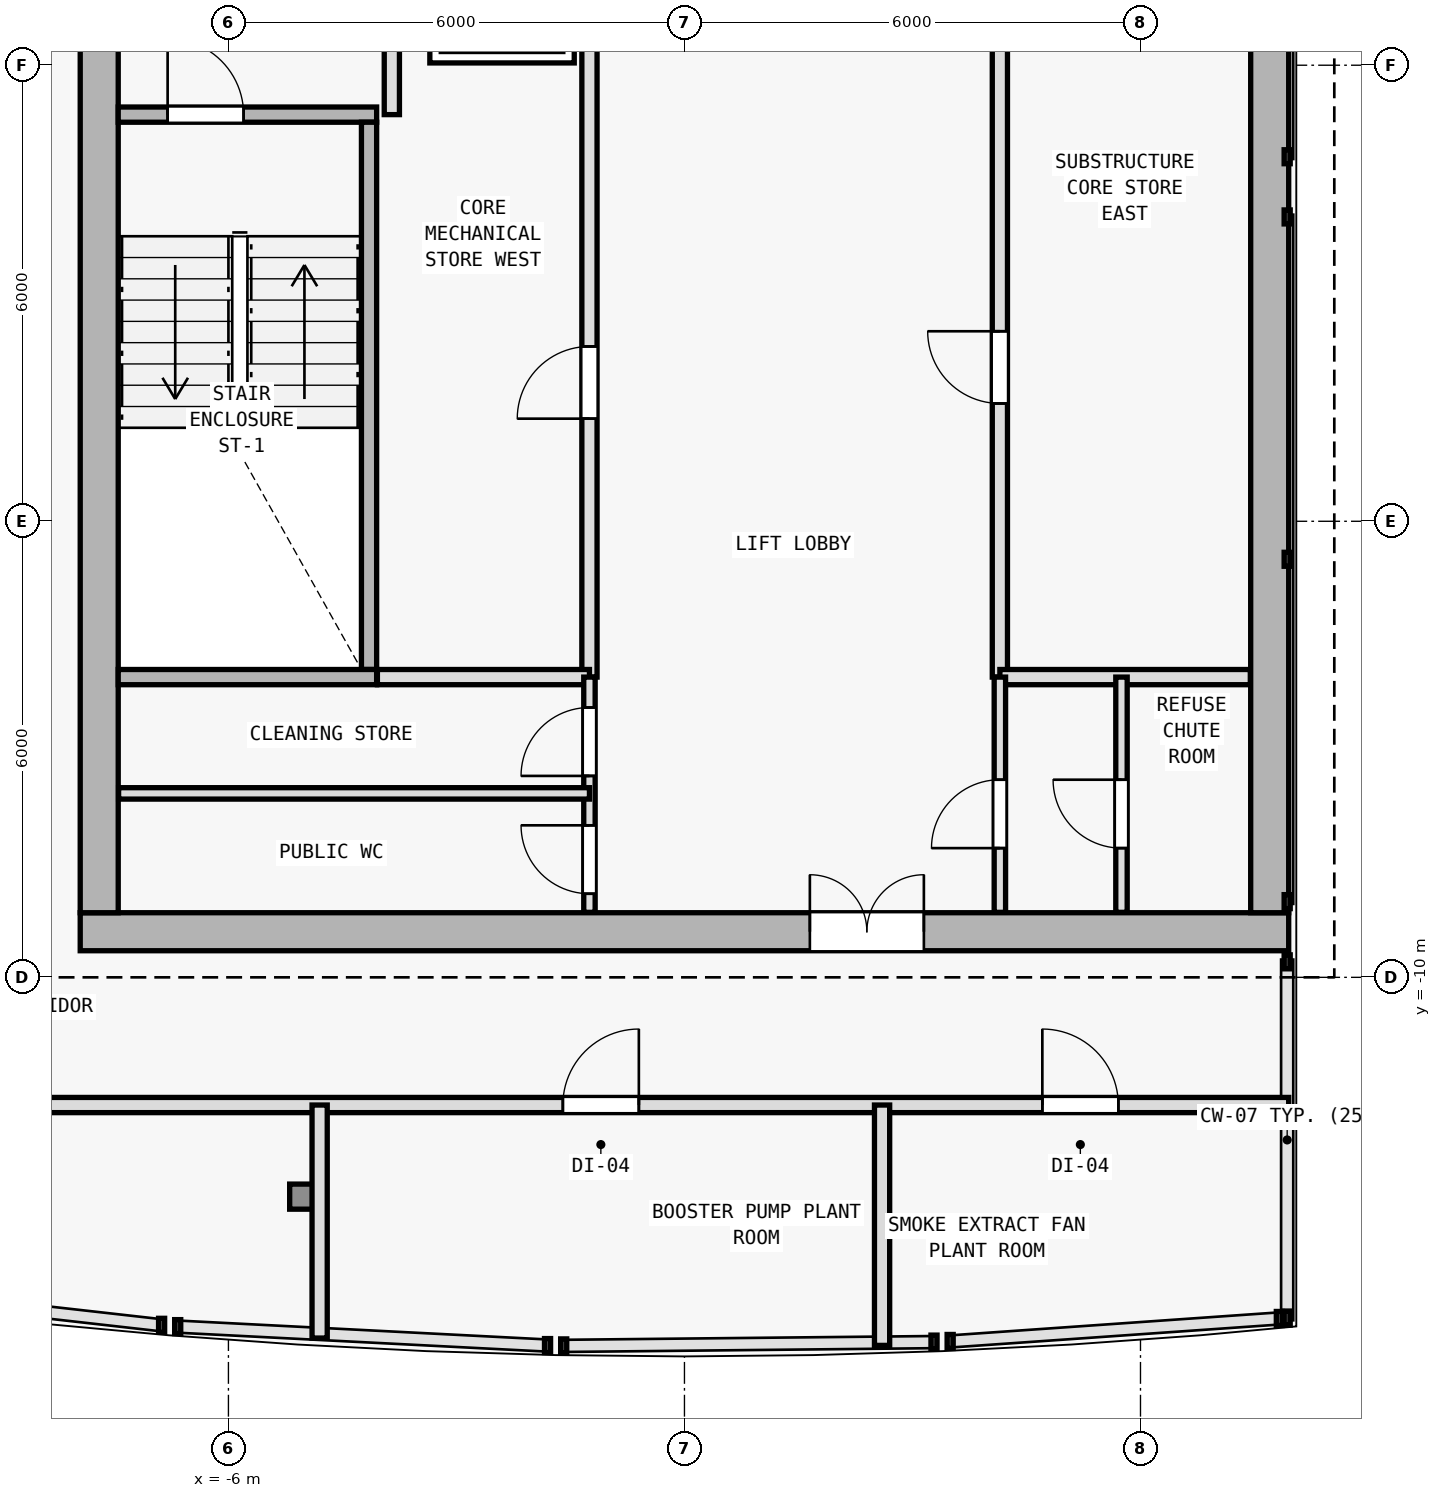
"""IFC4 building model, lengths in metres.
Left out: names, types, materials, properties, quantities, classifications, styles, units other than length and angle.
Written with IfcOpenShell. Run it as: python <this file> out.ifc"""

import sys

from ifc_helpers import new_model, si_unit, direction, frame, frame_2d, origin, origin_2d, place, context, subcontext, project, spatial, rectangle, i_section, extrude, element, fill, save


model = new_model("IFC4")
c1 = context("Model", 3, precision=1e-05, world=origin(), true_north=direction((0.0, 1.0)))
c2 = subcontext(c1, "Body", "Model", "MODEL_VIEW")
j1 = project(units=[si_unit("LENGTHUNIT", "METRE"), si_unit("PLANEANGLEUNIT", "RADIAN")], contexts=[c1])
p1 = place(None, origin())
s1 = spatial("IfcSite", under=j1, at=p1, CompositionType="ELEMENT")
p2 = place(p1, origin())
s2 = spatial("IfcBuilding", under=s1, at=p2, CompositionType="ELEMENT")
p3 = place(p2, frame((0.0, 0.0, 308.4)))
s3 = spatial("IfcBuildingStorey", under=s2, at=p3, CompositionType="ELEMENT", Elevation=308.4)
for number, where, z_axis, x_axis in (
    (1, (-7.7, -9.4, 0.0), (0.0, 0.0, 1.0), (1.0, 0.0, 0.0)),
    (2, (7.7, -9.4, 0.0), (0.0, 0.0, 1.0), (1.0, 0.0, 0.0)),
    (3, (0.0, -9.4, 0.0), (0.0, 0.0, 1.0), (1.0, 0.0, 0.0)),
    (4, (7.7, 0.4, 0.0), (0.0, 0.0, 1.0), (1.0, 0.0, 0.0)),
    (5, (-7.7, 2.0, 0.0), (0.0, 0.0, 1.0), (1.0, 0.0, 0.0)),
):
    element("IfcColumn", number, at=place(p3, frame(where, z_axis=z_axis, x_axis=x_axis)), inside=s3, PredefinedType="COLUMN", context=c2, shape_type="SweptSolid", body=[
        extrude(i_section(OverallWidth=0.374, OverallDepth=0.372, WebThickness=0.012, FlangeThickness=0.02, FilletRadius=0.015, at=origin_2d()), origin(), (0.0, 0.0, 1.0), 3.6),
    ])
p4 = place(p3, frame((-5.04, -12.885, 0.0), z_axis=(0.0, 0.0, 1.0), x_axis=(1.0, 0.0, 0.0)))
e6 = element("IfcColumn", 6, at=p4, inside=s3, PredefinedType="COLUMN", context=c2, shape_type="SweptSolid", body=[
    extrude(i_section(OverallWidth=0.309, OverallDepth=0.33, WebThickness=0.011, FlangeThickness=0.019, FilletRadius=0.027, at=origin_2d()), origin(), (0.0, 0.0, 1.0), 3.6),
])
p5 = place(p3, frame((-7.95, -9.4, 0.0), z_axis=(0.0, 0.0, 1.0), x_axis=(1.0, 0.0, 0.0)))
e7 = element("IfcWall", 7, at=p5, inside=s3, PredefinedType="SHEAR", context=c2, shape_type="SweptSolid", body=[
    extrude(rectangle(XDim=15.9, YDim=0.5, at=frame_2d((7.95, 0.0))), origin(), (0.0, 0.0, 1.0), 3.34),
])
p6 = place(p5, frame((9.6, 0.0, 0.0)))
e8 = element("IfcOpeningElement", 8, at=p6, cuts=e7, PredefinedType="OPENING", context=c2, shape_type="SweptSolid", body=[
    extrude(rectangle(XDim=1.5, YDim=2.2, at=frame_2d((0.75, 1.1))), frame((0.0, 0.26, 0.0), z_axis=(0.0, -1.0, 0.0), x_axis=(1.0, 0.0, 0.0)), (0.0, 0.0, 1.0), 0.52),
])
p7 = place(p3, frame((-7.7, -9.15, 0.0), z_axis=(0.0, 0.0, 1.0), x_axis=(0.0, 1.0, 0.0)))
e9 = element("IfcWall", 9, at=p7, inside=s3, PredefinedType="SHEAR", context=c2, shape_type="SweptSolid", body=[
    extrude(rectangle(XDim=19.1, YDim=0.5, at=frame_2d((9.55, 0.0))), origin(), (0.0, 0.0, 1.0), 3.34),
])
p8 = place(p7, frame((12.7, 0.0, 0.0)))
e10 = element("IfcOpeningElement", 10, at=p8, cuts=e9, PredefinedType="OPENING", context=c2, shape_type="SweptSolid", body=[
    extrude(rectangle(XDim=1.1, YDim=2.15, at=frame_2d((0.55, 1.075))), frame((0.0, 0.26, 0.0), z_axis=(0.0, -1.0, 0.0), x_axis=(1.0, 0.0, 0.0)), (0.0, 0.0, 1.0), 0.52),
])
p9 = place(p3, frame((7.7, 9.95, 0.0), z_axis=(0.0, 0.0, 1.0), x_axis=(0.0, -1.0, 0.0)))
e11 = element("IfcWall", 11, at=p9, inside=s3, PredefinedType="SHEAR", context=c2, shape_type="SweptSolid", body=[
    extrude(rectangle(XDim=19.1, YDim=0.5, at=frame_2d((9.55, 0.0))), origin(), (0.0, 0.0, 1.0), 3.34),
])
p10 = place(p3, frame((-7.45, 1.35, 0.0), z_axis=(0.0, 0.0, 1.0), x_axis=(1.0, 0.0, 0.0)))
e12 = element("IfcWall", 12, at=p10, inside=s3, PredefinedType="SOLIDWALL", context=c2, shape_type="SweptSolid", body=[
    extrude(rectangle(XDim=3.4, YDim=0.2, at=frame_2d((1.7, 0.0))), origin(), (0.0, 0.0, 1.0), 3.34),
])
p11 = place(p10, frame((0.65, 0.0, 0.0)))
e13 = element("IfcOpeningElement", 13, at=p11, cuts=e12, PredefinedType="OPENING", context=c2, shape_type="SweptSolid", body=[
    extrude(rectangle(XDim=1.0, YDim=2.15, at=frame_2d((0.5, 1.075))), frame((0.0, 0.11, 0.0), z_axis=(0.0, -1.0, 0.0), x_axis=(1.0, 0.0, 0.0)), (0.0, 0.0, 1.0), 0.22),
])
p12 = place(p3, frame((-4.15, -5.95, 0.0), z_axis=(0.0, 0.0, 1.0), x_axis=(0.0, 1.0, 0.0)))
e14 = element("IfcWall", 14, at=p12, inside=s3, PredefinedType="SOLIDWALL", context=c2, shape_type="SweptSolid", body=[
    extrude(rectangle(XDim=7.2, YDim=0.2, at=frame_2d((3.6, 0.0))), origin(), (0.0, 0.0, 1.0), 3.34),
])
p13 = place(p3, frame((-3.85, 1.35, 0.0), z_axis=(0.0, 0.0, 1.0), x_axis=(0.0, 1.0, 0.0)))
e15 = element("IfcWall", 15, at=p13, inside=s3, PredefinedType="SOLIDWALL", context=c2, shape_type="SweptSolid", body=[
    extrude(rectangle(XDim=8.595, YDim=0.2, at=frame_2d((4.297, 0.0))), origin(), (0.0, 0.0, 1.0), 3.34),
])
p14 = place(p13, frame((1.5, 0.0, 0.0)))
e16 = element("IfcOpeningElement", 16, at=p14, cuts=e15, PredefinedType="OPENING", context=c2, shape_type="SweptSolid", body=[
    extrude(rectangle(XDim=1.0, YDim=2.15, at=frame_2d((0.5, 1.075))), frame((0.0, 0.11, 0.0), z_axis=(0.0, -1.0, 0.0), x_axis=(1.0, 0.0, 0.0)), (0.0, 0.0, 1.0), 0.22),
])
p15 = place(p13, frame((3.18, 0.0, 0.0)))
e17 = element("IfcOpeningElement", 17, at=p15, cuts=e15, PredefinedType="OPENING", context=c2, shape_type="SweptSolid", body=[
    extrude(rectangle(XDim=1.0, YDim=2.15, at=frame_2d((0.5, 1.075))), frame((0.0, 0.11, 0.0), z_axis=(0.0, -1.0, 0.0), x_axis=(1.0, 0.0, 0.0)), (0.0, 0.0, 1.0), 0.22),
])
p16 = place(p3, frame((4.15, -6.05, 0.0), z_axis=(0.0, 0.0, 1.0), x_axis=(0.0, 1.0, 0.0)))
e18 = element("IfcWall", 18, at=p16, inside=s3, PredefinedType="SOLIDWALL", context=c2, shape_type="SweptSolid", body=[
    extrude(rectangle(XDim=8.7, YDim=0.2, at=frame_2d((4.35, 0.0))), origin(), (0.0, 0.0, 1.0), 3.34),
])
p17 = place(p16, frame((3.6, 0.0, 0.0)))
e19 = element("IfcOpeningElement", 19, at=p17, cuts=e18, PredefinedType="OPENING", context=c2, shape_type="SweptSolid", body=[
    extrude(rectangle(XDim=0.95, YDim=2.1, at=frame_2d((0.475, 1.05))), frame((0.0, 0.11, 0.0), z_axis=(0.0, -1.0, 0.0), x_axis=(1.0, 0.0, 0.0)), (0.0, 0.0, 1.0), 0.22),
])
p18 = place(p3, frame((-1.25, -6.05, 0.0), z_axis=(0.0, 0.0, 1.0), x_axis=(0.0, 1.0, 0.0)))
e20 = element("IfcWall", 20, at=p18, inside=s3, PredefinedType="SOLIDWALL", context=c2, shape_type="SweptSolid", body=[
    extrude(rectangle(XDim=8.7, YDim=0.2, at=frame_2d((4.35, 0.0))), origin(), (0.0, 0.0, 1.0), 3.34),
])
p19 = place(p18, frame((3.4, 0.0, 0.0)))
e21 = element("IfcOpeningElement", 21, at=p19, cuts=e20, PredefinedType="OPENING", context=c2, shape_type="SweptSolid", body=[
    extrude(rectangle(XDim=0.95, YDim=2.1, at=frame_2d((0.475, 1.05))), frame((0.0, 0.11, 0.0), z_axis=(0.0, -1.0, 0.0), x_axis=(1.0, 0.0, 0.0)), (0.0, 0.0, 1.0), 0.22),
])
p20 = place(p3, frame((-7.45, -6.05, 0.0), z_axis=(0.0, 0.0, 1.0), x_axis=(1.0, 0.0, 0.0)))
e22 = element("IfcWall", 22, at=p20, inside=s3, PredefinedType="SOLIDWALL", context=c2, shape_type="SweptSolid", body=[
    extrude(rectangle(XDim=3.4, YDim=0.2, at=frame_2d((1.7, 0.0))), origin(), (0.0, 0.0, 1.0), 3.34),
])
p21 = place(p3, frame((-4.04, -6.05, 0.0), z_axis=(0.0, 0.0, 1.0), x_axis=(1.0, 0.0, 0.0)))
e23 = element("IfcWall", 23, at=p21, inside=s3, PredefinedType="SOLIDWALL", context=c2, shape_type="SweptSolid", body=[
    extrude(rectangle(XDim=2.79, YDim=0.2, at=frame_2d((1.395, 0.0))), origin(), (0.0, 0.0, 1.0), 3.34),
])
p22 = place(p3, frame((4.15, -6.05, 0.0), z_axis=(0.0, 0.0, 1.0), x_axis=(1.0, 0.0, 0.0)))
e24 = element("IfcWall", 24, at=p22, inside=s3, PredefinedType="SOLIDWALL", context=c2, shape_type="SweptSolid", body=[
    extrude(rectangle(XDim=3.295, YDim=0.2, at=frame_2d((1.647, 0.0))), origin(), (0.0, 0.0, 1.0), 3.34),
])
p23 = place(p3, frame((-1.25, -9.145, 0.0), z_axis=(0.0, 0.0, 1.0), x_axis=(0.0, 1.0, 0.0)))
e25 = element("IfcWall", 25, at=p23, inside=s3, PredefinedType="PARTITIONING", context=c2, shape_type="SweptSolid", body=[
    extrude(rectangle(XDim=3.095, YDim=0.15, at=frame_2d((1.547, 0.0))), origin(), (0.0, 0.0, 1.0), 3.34),
])
p24 = place(p23, frame((1.795, 0.0, 0.0)))
e26 = element("IfcOpeningElement", 26, at=p24, cuts=e25, PredefinedType="OPENING", context=c2, shape_type="SweptSolid", body=[
    extrude(rectangle(XDim=0.9, YDim=2.1, at=frame_2d((0.45, 1.05))), frame((0.0, 0.085, 0.0), z_axis=(0.0, -1.0, 0.0), x_axis=(1.0, 0.0, 0.0)), (0.0, 0.0, 1.0), 0.17),
])
p25 = place(p23, frame((0.245, 0.0, 0.0)))
e27 = element("IfcOpeningElement", 27, at=p25, cuts=e25, PredefinedType="OPENING", context=c2, shape_type="SweptSolid", body=[
    extrude(rectangle(XDim=0.9, YDim=2.1, at=frame_2d((0.45, 1.05))), frame((0.0, 0.085, 0.0), z_axis=(0.0, -1.0, 0.0), x_axis=(1.0, 0.0, 0.0)), (0.0, 0.0, 1.0), 0.17),
])
p26 = place(p3, frame((4.15, -9.145, 0.0), z_axis=(0.0, 0.0, 1.0), x_axis=(0.0, 1.0, 0.0)))
e28 = element("IfcWall", 28, at=p26, inside=s3, PredefinedType="PARTITIONING", context=c2, shape_type="SweptSolid", body=[
    extrude(rectangle(XDim=3.095, YDim=0.15, at=frame_2d((1.547, 0.0))), origin(), (0.0, 0.0, 1.0), 3.34),
])
p27 = place(p26, frame((0.845, 0.0, 0.0)))
e29 = element("IfcOpeningElement", 29, at=p27, cuts=e28, PredefinedType="OPENING", context=c2, shape_type="SweptSolid", body=[
    extrude(rectangle(XDim=0.9, YDim=2.1, at=frame_2d((0.45, 1.05))), frame((0.0, 0.085, 0.0), z_axis=(0.0, -1.0, 0.0), x_axis=(1.0, 0.0, 0.0)), (0.0, 0.0, 1.0), 0.17),
])
p28 = place(p3, frame((-7.445, -7.58, 0.0), z_axis=(0.0, 0.0, 1.0), x_axis=(1.0, 0.0, 0.0)))
e30 = element("IfcWall", 30, at=p28, inside=s3, PredefinedType="PARTITIONING", context=c2, shape_type="SweptSolid", body=[
    extrude(rectangle(XDim=6.195, YDim=0.15, at=frame_2d((3.098, 0.0))), origin(), (0.0, 0.0, 1.0), 3.34),
])
p29 = place(p3, frame((5.75, -9.145, 0.0), z_axis=(0.0, 0.0, 1.0), x_axis=(0.0, 1.0, 0.0)))
e31 = element("IfcWall", 31, at=p29, inside=s3, PredefinedType="PARTITIONING", context=c2, shape_type="SweptSolid", body=[
    extrude(rectangle(XDim=3.095, YDim=0.15, at=frame_2d((1.547, 0.0))), origin(), (0.0, 0.0, 1.0), 3.34),
])
p30 = place(p29, frame((0.845, 0.0, 0.0)))
e32 = element("IfcOpeningElement", 32, at=p30, cuts=e31, PredefinedType="OPENING", context=c2, shape_type="SweptSolid", body=[
    extrude(rectangle(XDim=0.9, YDim=2.1, at=frame_2d((0.45, 1.05))), frame((0.0, 0.085, 0.0), z_axis=(0.0, -1.0, 0.0), x_axis=(1.0, 0.0, 0.0)), (0.0, 0.0, 1.0), 0.17),
])
p31 = place(p3, frame((-10.18, -11.68, 0.0), z_axis=(0.0, 0.0, 1.0), x_axis=(1.0, 0.0, 0.0)))
e33 = element("IfcWall", 33, at=p31, inside=s3, PredefinedType="SOLIDWALL", context=c2, shape_type="SweptSolid", body=[
    extrude(rectangle(XDim=18.13, YDim=0.2, at=frame_2d((9.065, 0.0))), origin(), (0.0, 0.0, 1.0), 2.995),
])
p32 = place(p31, frame((8.58, 0.0, 0.0)))
e34 = element("IfcOpeningElement", 34, at=p32, cuts=e33, PredefinedType="OPENING", context=c2, shape_type="SweptSolid", body=[
    extrude(rectangle(XDim=1.0, YDim=2.15, at=frame_2d((0.5, 1.075))), frame((0.0, 0.11, 0.0), z_axis=(0.0, -1.0, 0.0), x_axis=(1.0, 0.0, 0.0)), (0.0, 0.0, 1.0), 0.22),
])
p33 = place(p31, frame((14.889, 0.0, 0.0)))
e35 = element("IfcOpeningElement", 35, at=p33, cuts=e33, PredefinedType="OPENING", context=c2, shape_type="SweptSolid", body=[
    extrude(rectangle(XDim=1.0, YDim=2.15, at=frame_2d((0.5, 1.075))), frame((0.0, 0.11, 0.0), z_axis=(0.0, -1.0, 0.0), x_axis=(1.0, 0.0, 0.0)), (0.0, 0.0, 1.0), 0.22),
])
p34 = place(p3, frame((-4.8, -14.746, 0.0), z_axis=(0.0, 0.0, 1.0), x_axis=(0.0, 1.0, 0.0)))
e36 = element("IfcWall", 36, at=p34, inside=s3, PredefinedType="SOLIDWALL", context=c2, shape_type="SweptSolid", body=[
    extrude(rectangle(XDim=3.066, YDim=0.2, at=frame_2d((1.533, 0.0))), origin(), (0.0, 0.0, 1.0), 2.995),
])
p35 = place(p3, frame((2.6, -14.842, 0.0), z_axis=(0.0, 0.0, 1.0), x_axis=(0.0, 1.0, 0.0)))
e37 = element("IfcWall", 37, at=p35, inside=s3, PredefinedType="SOLIDWALL", context=c2, shape_type="SweptSolid", body=[
    extrude(rectangle(XDim=3.162, YDim=0.2, at=frame_2d((1.581, 0.0))), origin(), (0.0, 0.0, 1.0), 3.34),
])
p36 = place(p6, origin())
e38 = element("IfcDoor", 38, at=p36, inside=s3, OperationType="DOUBLE_DOOR_SINGLE_SWING", PredefinedType="DOOR", context=c2, shape_type="SweptSolid", body=[
    extrude(rectangle(XDim=1.5, YDim=2.2, at=frame_2d((0.75, 1.1))), frame((0.0, 0.025, 0.0), z_axis=(0.0, -1.0, 0.0), x_axis=(1.0, 0.0, 0.0)), (0.0, 0.0, 1.0), 0.05),
])
fill(e8, e38)
p37 = place(p11, origin())
e39 = element("IfcDoor", 39, at=p37, inside=s3, OperationType="SINGLE_SWING_LEFT", PredefinedType="DOOR", context=c2, shape_type="SweptSolid", body=[
    extrude(rectangle(XDim=1.0, YDim=2.15, at=frame_2d((0.5, 1.075))), frame((0.0, 0.025, 0.0), z_axis=(0.0, -1.0, 0.0), x_axis=(1.0, 0.0, 0.0)), (0.0, 0.0, 1.0), 0.05),
])
fill(e13, e39)
p38 = place(p17, origin())
e40 = element("IfcDoor", 40, at=p38, inside=s3, OperationType="SINGLE_SWING_RIGHT", PredefinedType="DOOR", context=c2, shape_type="SweptSolid", body=[
    extrude(rectangle(XDim=0.95, YDim=2.1, at=frame_2d((0.475, 1.05))), frame((0.0, 0.025, 0.0), z_axis=(0.0, -1.0, 0.0), x_axis=(1.0, 0.0, 0.0)), (0.0, 0.0, 1.0), 0.05),
])
fill(e19, e40)
p39 = place(p19, origin())
e41 = element("IfcDoor", 41, at=p39, inside=s3, OperationType="SINGLE_SWING_LEFT", PredefinedType="DOOR", context=c2, shape_type="SweptSolid", body=[
    extrude(rectangle(XDim=0.95, YDim=2.1, at=frame_2d((0.475, 1.05))), frame((0.0, 0.025, 0.0), z_axis=(0.0, -1.0, 0.0), x_axis=(1.0, 0.0, 0.0)), (0.0, 0.0, 1.0), 0.05),
])
fill(e21, e41)
p40 = place(p24, origin())
e42 = element("IfcDoor", 42, at=p40, inside=s3, OperationType="SINGLE_SWING_LEFT", PredefinedType="DOOR", context=c2, shape_type="SweptSolid", body=[
    extrude(rectangle(XDim=0.9, YDim=2.1, at=frame_2d((0.45, 1.05))), frame((0.0, 0.025, 0.0), z_axis=(0.0, -1.0, 0.0), x_axis=(1.0, 0.0, 0.0)), (0.0, 0.0, 1.0), 0.05),
])
fill(e26, e42)
p41 = place(p25, origin())
e43 = element("IfcDoor", 43, at=p41, inside=s3, OperationType="SINGLE_SWING_RIGHT", PredefinedType="DOOR", context=c2, shape_type="SweptSolid", body=[
    extrude(rectangle(XDim=0.9, YDim=2.1, at=frame_2d((0.45, 1.05))), frame((0.0, 0.025, 0.0), z_axis=(0.0, -1.0, 0.0), x_axis=(1.0, 0.0, 0.0)), (0.0, 0.0, 1.0), 0.05),
])
fill(e27, e43)
p42 = place(p27, origin())
e44 = element("IfcDoor", 44, at=p42, inside=s3, OperationType="SINGLE_SWING_LEFT", PredefinedType="DOOR", context=c2, shape_type="SweptSolid", body=[
    extrude(rectangle(XDim=0.9, YDim=2.1, at=frame_2d((0.45, 1.05))), frame((0.0, 0.025, 0.0), z_axis=(0.0, -1.0, 0.0), x_axis=(1.0, 0.0, 0.0)), (0.0, 0.0, 1.0), 0.05),
])
fill(e29, e44)
p43 = place(p30, origin())
e45 = element("IfcDoor", 45, at=p43, inside=s3, OperationType="SINGLE_SWING_RIGHT", PredefinedType="DOOR", context=c2, shape_type="SweptSolid", body=[
    extrude(rectangle(XDim=0.9, YDim=2.1, at=frame_2d((0.45, 1.05))), frame((0.0, 0.025, 0.0), z_axis=(0.0, -1.0, 0.0), x_axis=(1.0, 0.0, 0.0)), (0.0, 0.0, 1.0), 0.05),
])
fill(e32, e45)
p44 = place(p32, origin())
e46 = element("IfcDoor", 46, at=p44, inside=s3, OperationType="SINGLE_SWING_RIGHT", PredefinedType="DOOR", context=c2, shape_type="SweptSolid", body=[
    extrude(rectangle(XDim=1.0, YDim=2.15, at=frame_2d((0.5, 1.075))), frame((0.0, 0.025, 0.0), z_axis=(0.0, -1.0, 0.0), x_axis=(1.0, 0.0, 0.0)), (0.0, 0.0, 1.0), 0.05),
])
fill(e34, e46)
p45 = place(p33, origin())
e47 = element("IfcDoor", 47, at=p45, inside=s3, OperationType="SINGLE_SWING_LEFT", PredefinedType="DOOR", context=c2, shape_type="SweptSolid", body=[
    extrude(rectangle(XDim=1.0, YDim=2.15, at=frame_2d((0.5, 1.075))), frame((0.0, 0.025, 0.0), z_axis=(0.0, -1.0, 0.0), x_axis=(1.0, 0.0, 0.0)), (0.0, 0.0, 1.0), 0.05),
])
fill(e35, e47)
save(model, sys.argv[1])
